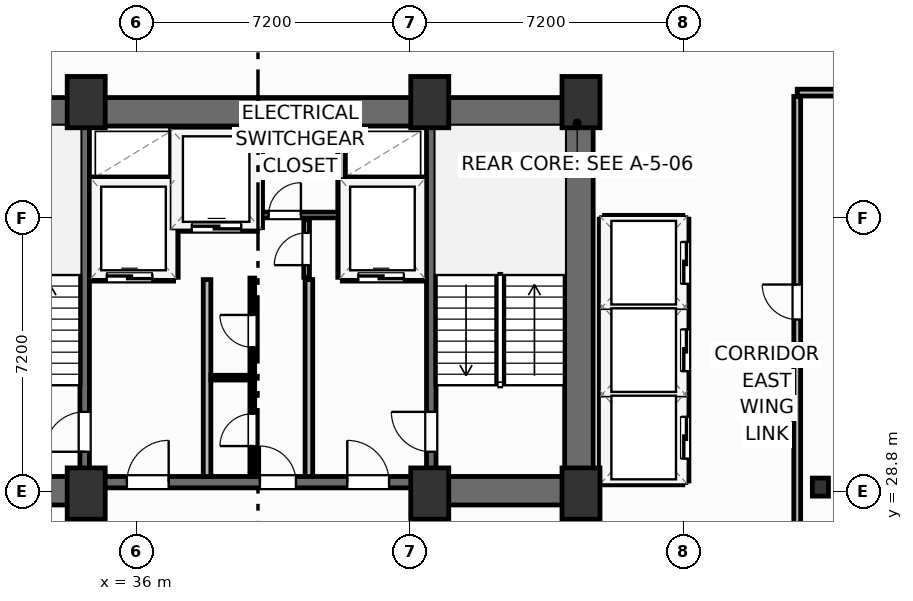
"""IFC4 building model, lengths in metres.
Left out: names, types, materials, properties, quantities, classifications, styles, units other than length and angle.
Written with IfcOpenShell. Run it as: python <this file> out.ifc"""

import sys

from ifc_helpers import new_model, si_unit, direction, frame, frame_2d, origin, origin_2d, place, context, subcontext, project, spatial, rectangle, i_section, extrude, element, fill, save


model = new_model("IFC4")
c1 = context("Model", 3, precision=1e-05, world=origin(), true_north=direction((0.0, 1.0)))
c2 = subcontext(c1, "Body", "Model", "MODEL_VIEW")
j1 = project(units=[si_unit("LENGTHUNIT", "METRE"), si_unit("PLANEANGLEUNIT", "RADIAN")], contexts=[c1])
p1 = place(None, origin())
s1 = spatial("IfcSite", under=j1, at=p1, CompositionType="ELEMENT")
p2 = place(p1, origin())
s2 = spatial("IfcBuilding", under=s1, at=p2, CompositionType="ELEMENT")
p3 = place(p2, frame((0.0, 0.0, 129.1)))
s3 = spatial("IfcBuildingStorey", under=s2, at=p3, CompositionType="ELEMENT", Elevation=129.1)
for number, where, z_axis, x_axis in (
    (1, (34.68, 28.75, 0.0), (0.0, 0.0, 1.0), (1.0, 0.0, 0.0)),
    (2, (43.72, 28.75, 0.0), (0.0, 0.0, 1.0), (1.0, 0.0, 0.0)),
    (3, (47.7, 28.75, 0.0), (0.0, 0.0, 1.0), (1.0, 0.0, 0.0)),
    (4, (34.68, 39.05, 0.0), (0.0, 0.0, 1.0), (1.0, 0.0, 0.0)),
    (5, (43.72, 39.05, 0.0), (0.0, 0.0, 1.0), (1.0, 0.0, 0.0)),
    (6, (47.7, 39.05, 0.0), (0.0, 0.0, 1.0), (1.0, 0.0, 0.0)),
):
    element("IfcColumn", number, at=place(p3, frame(where, z_axis=z_axis, x_axis=x_axis)), inside=s3, PredefinedType="COLUMN", context=c2, shape_type="SweptSolid", body=[
        extrude(rectangle(XDim=1.0, YDim=1.35, at=origin_2d()), origin(), (0.0, 0.0, 1.0), 3.7),
    ])
p4 = place(p3, frame((54.0, 28.92, 0.0), z_axis=(0.0, 0.0, 1.0), x_axis=(1.0, 0.0, 0.0)))
e7 = element("IfcColumn", 7, at=p4, inside=s3, PredefinedType="COLUMN", context=c2, shape_type="SweptSolid", body=[
    extrude(i_section(OverallWidth=0.424, OverallDepth=0.474, WebThickness=0.048, FlangeThickness=0.077, FilletRadius=0.025, at=origin_2d()), origin(), (0.0, 0.0, 1.0), 3.7),
])
p5 = place(p3, frame((30.38, 38.795, 0.0), z_axis=(0.0, 0.0, 1.0), x_axis=(1.0, 0.0, 0.0)))
e8 = element("IfcWall", 8, at=p5, inside=s3, PredefinedType="SHEAR", context=c2, shape_type="SweptSolid", body=[
    extrude(rectangle(XDim=17.64, YDim=0.75, at=frame_2d((8.82, 0.0))), origin(), (0.0, 0.0, 1.0), 3.45),
])
p6 = place(p3, frame((47.645, 29.2, 0.0), z_axis=(0.0, 0.0, 1.0), x_axis=(0.0, 1.0, 0.0)))
e9 = element("IfcWall", 9, at=p6, inside=s3, PredefinedType="SHEAR", context=c2, shape_type="SweptSolid", body=[
    extrude(rectangle(XDim=9.22, YDim=0.75, at=frame_2d((4.61, 0.0))), origin(), (0.0, 0.0, 1.0), 3.45),
])
p7 = place(p3, frame((30.38, 28.825, 0.0), z_axis=(0.0, 0.0, 1.0), x_axis=(1.0, 0.0, 0.0)))
e10 = element("IfcWall", 10, at=p7, inside=s3, PredefinedType="SHEAR", context=c2, shape_type="SweptSolid", body=[
    extrude(rectangle(XDim=4.42, YDim=0.75, at=frame_2d((2.21, 0.0))), origin(), (0.0, 0.0, 1.0), 3.45),
])
p8 = place(p3, frame((43.6, 28.825, 0.0), z_axis=(0.0, 0.0, 1.0), x_axis=(1.0, 0.0, 0.0)))
e11 = element("IfcWall", 11, at=p8, inside=s3, PredefinedType="SHEAR", context=c2, shape_type="SweptSolid", body=[
    extrude(rectangle(XDim=4.42, YDim=0.75, at=frame_2d((2.21, 0.0))), origin(), (0.0, 0.0, 1.0), 3.45),
])
p9 = place(p3, frame((34.8, 29.05, 0.0), z_axis=(0.0, 0.0, 1.0), x_axis=(1.0, 0.0, 0.0)))
e12 = element("IfcWall", 12, at=p9, inside=s3, PredefinedType="SHEAR", context=c2, shape_type="SweptSolid", body=[
    extrude(rectangle(XDim=8.8, YDim=0.3, at=frame_2d((4.4, 0.0))), origin(), (0.0, 0.0, 1.0), 3.45),
])
p10 = place(p9, frame((0.95, 0.0, 0.0)))
e13 = element("IfcOpeningElement", 13, at=p10, cuts=e12, PredefinedType="OPENING", context=c2, shape_type="SweptSolid", body=[
    extrude(rectangle(XDim=1.1, YDim=2.15, at=frame_2d((0.55, 1.075))), frame((0.0, 0.16, 0.0), z_axis=(0.0, -1.0, 0.0), x_axis=(1.0, 0.0, 0.0)), (0.0, 0.0, 1.0), 0.32),
])
p11 = place(p9, frame((6.75, 0.0, 0.0)))
e14 = element("IfcOpeningElement", 14, at=p11, cuts=e12, PredefinedType="OPENING", context=c2, shape_type="SweptSolid", body=[
    extrude(rectangle(XDim=1.1, YDim=2.15, at=frame_2d((0.55, 1.075))), frame((0.0, 0.16, 0.0), z_axis=(0.0, -1.0, 0.0), x_axis=(1.0, 0.0, 0.0)), (0.0, 0.0, 1.0), 0.32),
])
p12 = place(p9, frame((4.45, 0.0, 0.0)))
e15 = element("IfcOpeningElement", 15, at=p12, cuts=e12, PredefinedType="OPENING", context=c2, shape_type="SweptSolid", body=[
    extrude(rectangle(XDim=0.95, YDim=2.15, at=frame_2d((0.475, 1.075))), frame((0.0, 0.16, 0.0), z_axis=(0.0, -1.0, 0.0), x_axis=(1.0, 0.0, 0.0)), (0.0, 0.0, 1.0), 0.32),
])
p13 = place(p3, frame((34.64, 29.2, 0.0), z_axis=(0.0, 0.0, 1.0), x_axis=(0.0, 1.0, 0.0)))
e16 = element("IfcWall", 16, at=p13, inside=s3, PredefinedType="SHEAR", context=c2, shape_type="SweptSolid", body=[
    extrude(rectangle(XDim=9.22, YDim=0.25, at=frame_2d((4.61, 0.0))), origin(), (0.0, 0.0, 1.0), 3.45),
])
p14 = place(p13, frame((0.65, 0.0, 0.0)))
e17 = element("IfcOpeningElement", 17, at=p14, cuts=e16, PredefinedType="OPENING", context=c2, shape_type="SweptSolid", body=[
    extrude(rectangle(XDim=1.05, YDim=2.15, at=frame_2d((0.525, 1.075))), frame((0.0, 0.135, 0.0), z_axis=(0.0, -1.0, 0.0), x_axis=(1.0, 0.0, 0.0)), (0.0, 0.0, 1.0), 0.27),
])
p15 = place(p3, frame((43.76, 29.2, 0.0), z_axis=(0.0, 0.0, 1.0), x_axis=(0.0, 1.0, 0.0)))
e18 = element("IfcWall", 18, at=p15, inside=s3, PredefinedType="SHEAR", context=c2, shape_type="SweptSolid", body=[
    extrude(rectangle(XDim=9.22, YDim=0.25, at=frame_2d((4.61, 0.0))), origin(), (0.0, 0.0, 1.0), 3.45),
])
p16 = place(p15, frame((0.65, 0.0, 0.0)))
e19 = element("IfcOpeningElement", 19, at=p16, cuts=e18, PredefinedType="OPENING", context=c2, shape_type="SweptSolid", body=[
    extrude(rectangle(XDim=1.05, YDim=2.15, at=frame_2d((0.525, 1.075))), frame((0.0, 0.135, 0.0), z_axis=(0.0, -1.0, 0.0), x_axis=(1.0, 0.0, 0.0)), (0.0, 0.0, 1.0), 0.27),
])
p17 = place(p3, frame((53.39, 27.53, 0.0), z_axis=(0.0, 0.0, 1.0), x_axis=(0.0, 1.0, 0.0)))
e20 = element("IfcWall", 20, at=p17, inside=s3, PredefinedType="PARTITIONING", context=c2, shape_type="SweptSolid", body=[
    extrude(rectangle(XDim=11.67, YDim=0.18, at=frame_2d((5.835, 0.0))), origin(), (0.0, 0.0, 1.0), 3.45),
])
p18 = place(p17, frame((5.8, 0.0, 0.0)))
e21 = element("IfcOpeningElement", 21, at=p18, cuts=e20, PredefinedType="OPENING", context=c2, shape_type="SweptSolid", body=[
    extrude(rectangle(XDim=0.92, YDim=2.05, at=frame_2d((0.46, 1.025))), frame((0.0, 0.1, 0.0), z_axis=(0.0, -1.0, 0.0), x_axis=(1.0, 0.0, 0.0)), (0.0, 0.0, 1.0), 0.2),
])
p19 = place(p3, frame((53.39, 39.3, 0.0), z_axis=(0.0, 0.0, 1.0), x_axis=(1.0, 0.0, 0.0)))
e22 = element("IfcWall", 22, at=p19, inside=s3, PredefinedType="PARTITIONING", context=c2, shape_type="SweptSolid", body=[
    extrude(rectangle(XDim=24.74, YDim=0.18, at=frame_2d((12.37, 0.0))), origin(), (0.0, 0.0, 1.0), 3.45),
])
for number, where, z_axis, x_axis in (
    (23, (37.86, 29.2, 0.0), (0.0, 0.0, 1.0), (0.0, 1.0, 0.0)),
    (24, (40.54, 29.2, 0.0), (0.0, 0.0, 1.0), (0.0, 1.0, 0.0)),
):
    element("IfcWall", number, at=place(p3, frame(where, z_axis=z_axis, x_axis=x_axis)), inside=s3, PredefinedType="PARTITIONING", context=c2, shape_type="SweptSolid", body=[
        extrude(rectangle(XDim=5.18, YDim=0.2, at=frame_2d((2.59, 0.0))), origin(), (0.0, 0.0, 1.0), 3.45),
    ])
p20 = place(p3, frame((34.8, 34.44, 0.0), z_axis=(0.0, 0.0, 1.0), x_axis=(1.0, 0.0, 0.0)))
e25 = element("IfcWall", 25, at=p20, inside=s3, PredefinedType="PARTITIONING", context=c2, shape_type="SweptSolid", body=[
    extrude(rectangle(XDim=2.18, YDim=0.2, at=frame_2d((1.09, 0.0))), origin(), (0.0, 0.0, 1.0), 3.45),
])
p21 = place(p20, frame((0.42, 0.0, 0.0)))
e26 = element("IfcOpeningElement", 26, at=p21, cuts=e25, PredefinedType="OPENING", context=c2, shape_type="SweptSolid", body=[
    extrude(rectangle(XDim=1.2, YDim=2.2, at=frame_2d((0.6, 1.1))), frame((0.0, 0.11, 0.0), z_axis=(0.0, -1.0, 0.0), x_axis=(1.0, 0.0, 0.0)), (0.0, 0.0, 1.0), 0.22),
])
p22 = place(p3, frame((34.8, 36.98, 0.0), z_axis=(0.0, 0.0, 1.0), x_axis=(1.0, 0.0, 0.0)))
e27 = element("IfcWall", 27, at=p22, inside=s3, PredefinedType="PARTITIONING", context=c2, shape_type="SweptSolid", body=[
    extrude(rectangle(XDim=2.18, YDim=0.2, at=frame_2d((1.09, 0.0))), origin(), (0.0, 0.0, 1.0), 3.45),
])
p23 = place(p3, frame((37.0, 34.44, 0.0), z_axis=(0.0, 0.0, 1.0), x_axis=(0.0, 1.0, 0.0)))
e28 = element("IfcWall", 28, at=p23, inside=s3, PredefinedType="PARTITIONING", context=c2, shape_type="SweptSolid", body=[
    extrude(rectangle(XDim=3.9, YDim=0.2, at=frame_2d((1.95, 0.0))), origin(), (0.0, 0.0, 1.0), 3.45),
])
p24 = place(p3, frame((41.42, 34.44, 0.0), z_axis=(0.0, 0.0, 1.0), x_axis=(1.0, 0.0, 0.0)))
e29 = element("IfcWall", 29, at=p24, inside=s3, PredefinedType="PARTITIONING", context=c2, shape_type="SweptSolid", body=[
    extrude(rectangle(XDim=2.18, YDim=0.2, at=frame_2d((1.09, 0.0))), origin(), (0.0, 0.0, 1.0), 3.45),
])
p25 = place(p24, frame((0.42, 0.0, 0.0)))
e30 = element("IfcOpeningElement", 30, at=p25, cuts=e29, PredefinedType="OPENING", context=c2, shape_type="SweptSolid", body=[
    extrude(rectangle(XDim=1.2, YDim=2.2, at=frame_2d((0.6, 1.1))), frame((0.0, 0.11, 0.0), z_axis=(0.0, -1.0, 0.0), x_axis=(1.0, 0.0, 0.0)), (0.0, 0.0, 1.0), 0.22),
])
p26 = place(p3, frame((41.42, 36.98, 0.0), z_axis=(0.0, 0.0, 1.0), x_axis=(1.0, 0.0, 0.0)))
e31 = element("IfcWall", 31, at=p26, inside=s3, PredefinedType="PARTITIONING", context=c2, shape_type="SweptSolid", body=[
    extrude(rectangle(XDim=2.18, YDim=0.2, at=frame_2d((1.09, 0.0))), origin(), (0.0, 0.0, 1.0), 3.45),
])
p27 = place(p3, frame((41.4, 34.44, 0.0), z_axis=(0.0, 0.0, 1.0), x_axis=(0.0, 1.0, 0.0)))
e32 = element("IfcWall", 32, at=p27, inside=s3, PredefinedType="PARTITIONING", context=c2, shape_type="SweptSolid", body=[
    extrude(rectangle(XDim=3.9, YDim=0.2, at=frame_2d((1.95, 0.0))), origin(), (0.0, 0.0, 1.0), 3.45),
])
p28 = place(p3, frame((37.06, 35.75, 0.0), z_axis=(0.0, 0.0, 1.0), x_axis=(1.0, 0.0, 0.0)))
e33 = element("IfcWall", 33, at=p28, inside=s3, PredefinedType="PARTITIONING", context=c2, shape_type="SweptSolid", body=[
    extrude(rectangle(XDim=2.12, YDim=0.2, at=frame_2d((1.06, 0.0))), origin(), (0.0, 0.0, 1.0), 3.45),
])
p29 = place(p28, frame((0.4, 0.0, 0.0)))
e34 = element("IfcOpeningElement", 34, at=p29, cuts=e33, PredefinedType="OPENING", context=c2, shape_type="SweptSolid", body=[
    extrude(rectangle(XDim=1.3, YDim=2.2, at=frame_2d((0.65, 1.1))), frame((0.0, 0.11, 0.0), z_axis=(0.0, -1.0, 0.0), x_axis=(1.0, 0.0, 0.0)), (0.0, 0.0, 1.0), 0.22),
])
p30 = place(p3, frame((39.22, 35.75, 0.0), z_axis=(0.0, 0.0, 1.0), x_axis=(0.0, 1.0, 0.0)))
e35 = element("IfcWall", 35, at=p30, inside=s3, PredefinedType="PARTITIONING", context=c2, shape_type="SweptSolid", body=[
    extrude(rectangle(XDim=2.59, YDim=0.2, at=frame_2d((1.295, 0.0))), origin(), (0.0, 0.0, 1.0), 3.45),
])
p31 = place(p3, frame((39.3, 36.08, 0.0), z_axis=(0.0, 0.0, 1.0), x_axis=(1.0, 0.0, 0.0)))
e36 = element("IfcWall", 36, at=p31, inside=s3, PredefinedType="PARTITIONING", context=c2, shape_type="SweptSolid", body=[
    extrude(rectangle(XDim=2.02, YDim=0.15, at=frame_2d((1.01, 0.0))), origin(), (0.0, 0.0, 1.0), 3.45),
])
p32 = place(p31, frame((0.18, 0.0, 0.0)))
e37 = element("IfcOpeningElement", 37, at=p32, cuts=e36, PredefinedType="OPENING", context=c2, shape_type="SweptSolid", body=[
    extrude(rectangle(XDim=0.85, YDim=2.05, at=frame_2d((0.425, 1.025))), frame((0.0, 0.085, 0.0), z_axis=(0.0, -1.0, 0.0), x_axis=(1.0, 0.0, 0.0)), (0.0, 0.0, 1.0), 0.17),
])
p33 = place(p3, frame((40.48, 34.44, 0.0), z_axis=(0.0, 0.0, 1.0), x_axis=(0.0, 1.0, 0.0)))
e38 = element("IfcWall", 38, at=p33, inside=s3, PredefinedType="PARTITIONING", context=c2, shape_type="SweptSolid", body=[
    extrude(rectangle(XDim=1.52, YDim=0.15, at=frame_2d((0.76, 0.0))), origin(), (0.0, 0.0, 1.0), 3.45),
])
p34 = place(p33, frame((0.32, 0.0, 0.0)))
e39 = element("IfcOpeningElement", 39, at=p34, cuts=e38, PredefinedType="OPENING", context=c2, shape_type="SweptSolid", body=[
    extrude(rectangle(XDim=0.85, YDim=2.05, at=frame_2d((0.425, 1.025))), frame((0.0, 0.085, 0.0), z_axis=(0.0, -1.0, 0.0), x_axis=(1.0, 0.0, 0.0)), (0.0, 0.0, 1.0), 0.17),
])
p35 = place(p3, frame((37.96, 31.8, 0.0), z_axis=(0.0, 0.0, 1.0), x_axis=(1.0, 0.0, 0.0)))
e40 = element("IfcWall", 40, at=p35, inside=s3, PredefinedType="PARTITIONING", context=c2, shape_type="SweptSolid", body=[
    extrude(rectangle(XDim=1.09, YDim=0.125, at=frame_2d((0.545, 0.0))), origin(), (0.0, 0.0, 1.0), 3.45),
])
p36 = place(p3, frame((39.05, 29.2, 0.0), z_axis=(0.0, 0.0, 1.0), x_axis=(0.0, 1.0, 0.0)))
e41 = element("IfcWall", 41, at=p36, inside=s3, PredefinedType="PARTITIONING", context=c2, shape_type="SweptSolid", body=[
    extrude(rectangle(XDim=5.22, YDim=0.125, at=frame_2d((2.61, 0.0))), origin(), (0.0, 0.0, 1.0), 3.45),
])
p37 = place(p36, frame((0.8, 0.0, 0.0)))
e42 = element("IfcOpeningElement", 42, at=p37, cuts=e41, PredefinedType="OPENING", context=c2, shape_type="SweptSolid", body=[
    extrude(rectangle(XDim=0.85, YDim=2.05, at=frame_2d((0.425, 1.025))), frame((0.0, 0.073, 0.0), z_axis=(0.0, -1.0, 0.0), x_axis=(1.0, 0.0, 0.0)), (0.0, 0.0, 1.0), 0.145),
])
p38 = place(p36, frame((3.4, 0.0, 0.0)))
e43 = element("IfcOpeningElement", 43, at=p38, cuts=e41, PredefinedType="OPENING", context=c2, shape_type="SweptSolid", body=[
    extrude(rectangle(XDim=0.85, YDim=2.05, at=frame_2d((0.425, 1.025))), frame((0.0, 0.073, 0.0), z_axis=(0.0, -1.0, 0.0), x_axis=(1.0, 0.0, 0.0)), (0.0, 0.0, 1.0), 0.145),
])
for number, where, z_axis, x_axis in (
    (44, (48.32, 31.375, 0.0), (0.0, 0.0, 1.0), (1.0, 0.0, 0.0)),
    (45, (48.32, 33.675, 0.0), (0.0, 0.0, 1.0), (1.0, 0.0, 0.0)),
):
    element("IfcWall", number, at=place(p3, frame(where, z_axis=z_axis, x_axis=x_axis)), inside=s3, PredefinedType="PARTITIONING", context=c2, shape_type="SweptSolid", body=[
        extrude(rectangle(XDim=2.06, YDim=0.2, at=frame_2d((1.03, 0.0))), origin(), (0.0, 0.0, 1.0), 3.45),
    ])
p39 = place(p3, frame((48.32, 29.08, 0.0), z_axis=(0.0, 0.0, 1.0), x_axis=(1.0, 0.0, 0.0)))
e46 = element("IfcWall", 46, at=p39, inside=s3, PredefinedType="PARTITIONING", context=c2, shape_type="SweptSolid", body=[
    extrude(rectangle(XDim=2.06, YDim=0.2, at=frame_2d((1.03, 0.0))), origin(), (0.0, 0.0, 1.0), 2.662),
])
p40 = place(p3, frame((48.32, 35.97, 0.0), z_axis=(0.0, 0.0, 1.0), x_axis=(1.0, 0.0, 0.0)))
e47 = element("IfcWall", 47, at=p40, inside=s3, PredefinedType="PARTITIONING", context=c2, shape_type="SweptSolid", body=[
    extrude(rectangle(XDim=2.06, YDim=0.2, at=frame_2d((1.03, 0.0))), origin(), (0.0, 0.0, 1.0), 3.45),
])
p41 = place(p3, frame((48.28, 29.08, 0.0), z_axis=(0.0, 0.0, 1.0), x_axis=(0.0, 1.0, 0.0)))
e48 = element("IfcWall", 48, at=p41, inside=s3, PredefinedType="PARTITIONING", context=c2, shape_type="SweptSolid", body=[
    extrude(rectangle(XDim=6.89, YDim=0.2, at=frame_2d((3.445, 0.0))), origin(), (0.0, 0.0, 1.0), 3.45),
])
p42 = place(p3, frame((50.44, 29.08, 0.0), z_axis=(0.0, 0.0, 1.0), x_axis=(0.0, 1.0, 0.0)))
e49 = element("IfcWall", 49, at=p42, inside=s3, PredefinedType="PARTITIONING", context=c2, shape_type="SweptSolid", body=[
    extrude(rectangle(XDim=6.89, YDim=0.2, at=frame_2d((3.445, 0.0))), origin(), (0.0, 0.0, 1.0), 3.45),
])
p43 = place(p42, frame((0.59, 0.0, 0.0)))
e50 = element("IfcOpeningElement", 50, at=p43, cuts=e49, PredefinedType="OPENING", context=c2, shape_type="SweptSolid", body=[
    extrude(rectangle(XDim=1.1, YDim=2.15, at=frame_2d((0.55, 1.075))), frame((0.0, 0.11, 0.0), z_axis=(0.0, -1.0, 0.0), x_axis=(1.0, 0.0, 0.0)), (0.0, 0.0, 1.0), 0.22),
])
p44 = place(p42, frame((2.89, 0.0, 0.0)))
e51 = element("IfcOpeningElement", 51, at=p44, cuts=e49, PredefinedType="OPENING", context=c2, shape_type="SweptSolid", body=[
    extrude(rectangle(XDim=1.1, YDim=2.15, at=frame_2d((0.55, 1.075))), frame((0.0, 0.11, 0.0), z_axis=(0.0, -1.0, 0.0), x_axis=(1.0, 0.0, 0.0)), (0.0, 0.0, 1.0), 0.22),
])
p45 = place(p42, frame((5.19, 0.0, 0.0)))
e52 = element("IfcOpeningElement", 52, at=p45, cuts=e49, PredefinedType="OPENING", context=c2, shape_type="SweptSolid", body=[
    extrude(rectangle(XDim=1.1, YDim=2.15, at=frame_2d((0.55, 1.075))), frame((0.0, 0.11, 0.0), z_axis=(0.0, -1.0, 0.0), x_axis=(1.0, 0.0, 0.0)), (0.0, 0.0, 1.0), 0.22),
])
p46 = place(p18, origin())
e53 = element("IfcDoor", 53, at=p46, inside=s3, OperationType="SINGLE_SWING_RIGHT", PredefinedType="DOOR", context=c2, shape_type="SweptSolid", body=[
    extrude(rectangle(XDim=0.92, YDim=2.05, at=frame_2d((0.46, 1.025))), frame((0.0, 0.025, 0.0), z_axis=(0.0, -1.0, 0.0), x_axis=(1.0, 0.0, 0.0)), (0.0, 0.0, 1.0), 0.05),
])
fill(e21, e53)
p47 = place(p14, origin())
e54 = element("IfcDoor", 54, at=p47, inside=s3, OperationType="SINGLE_SWING_LEFT", PredefinedType="DOOR", context=c2, shape_type="SweptSolid", body=[
    extrude(rectangle(XDim=1.05, YDim=2.15, at=frame_2d((0.525, 1.075))), frame((0.0, 0.025, 0.0), z_axis=(0.0, -1.0, 0.0), x_axis=(1.0, 0.0, 0.0)), (0.0, 0.0, 1.0), 0.05),
])
fill(e17, e54)
p48 = place(p16, origin())
e55 = element("IfcDoor", 55, at=p48, inside=s3, OperationType="SINGLE_SWING_RIGHT", PredefinedType="DOOR", context=c2, shape_type="SweptSolid", body=[
    extrude(rectangle(XDim=1.05, YDim=2.15, at=frame_2d((0.525, 1.075))), frame((0.0, 0.025, 0.0), z_axis=(0.0, -1.0, 0.0), x_axis=(1.0, 0.0, 0.0)), (0.0, 0.0, 1.0), 0.05),
])
fill(e19, e55)
p49 = place(p10, origin())
e56 = element("IfcDoor", 56, at=p49, inside=s3, OperationType="SINGLE_SWING_RIGHT", PredefinedType="DOOR", context=c2, shape_type="SweptSolid", body=[
    extrude(rectangle(XDim=1.1, YDim=2.15, at=frame_2d((0.55, 1.075))), frame((0.0, 0.025, 0.0), z_axis=(0.0, -1.0, 0.0), x_axis=(1.0, 0.0, 0.0)), (0.0, 0.0, 1.0), 0.05),
])
fill(e13, e56)
p50 = place(p11, origin())
e57 = element("IfcDoor", 57, at=p50, inside=s3, OperationType="SINGLE_SWING_LEFT", PredefinedType="DOOR", context=c2, shape_type="SweptSolid", body=[
    extrude(rectangle(XDim=1.1, YDim=2.15, at=frame_2d((0.55, 1.075))), frame((0.0, 0.025, 0.0), z_axis=(0.0, -1.0, 0.0), x_axis=(1.0, 0.0, 0.0)), (0.0, 0.0, 1.0), 0.05),
])
fill(e14, e57)
p51 = place(p21, origin())
e58 = element("IfcDoor", 58, at=p51, inside=s3, OperationType="SLIDING_TO_LEFT", PredefinedType="DOOR", context=c2, shape_type="SweptSolid", body=[
    extrude(rectangle(XDim=1.2, YDim=2.2, at=frame_2d((0.6, 1.1))), frame((0.0, 0.025, 0.0), z_axis=(0.0, -1.0, 0.0), x_axis=(1.0, 0.0, 0.0)), (0.0, 0.0, 1.0), 0.05),
])
fill(e26, e58)
p52 = place(p25, origin())
e59 = element("IfcDoor", 59, at=p52, inside=s3, OperationType="SLIDING_TO_LEFT", PredefinedType="DOOR", context=c2, shape_type="SweptSolid", body=[
    extrude(rectangle(XDim=1.2, YDim=2.2, at=frame_2d((0.6, 1.1))), frame((0.0, 0.025, 0.0), z_axis=(0.0, -1.0, 0.0), x_axis=(1.0, 0.0, 0.0)), (0.0, 0.0, 1.0), 0.05),
])
fill(e30, e59)
p53 = place(p29, origin())
e60 = element("IfcDoor", 60, at=p53, inside=s3, OperationType="SLIDING_TO_LEFT", PredefinedType="DOOR", context=c2, shape_type="SweptSolid", body=[
    extrude(rectangle(XDim=1.3, YDim=2.2, at=frame_2d((0.65, 1.1))), frame((0.0, 0.025, 0.0), z_axis=(0.0, -1.0, 0.0), x_axis=(1.0, 0.0, 0.0)), (0.0, 0.0, 1.0), 0.05),
])
fill(e34, e60)
p54 = place(p32, origin())
e61 = element("IfcDoor", 61, at=p54, inside=s3, OperationType="SINGLE_SWING_RIGHT", PredefinedType="DOOR", context=c2, shape_type="SweptSolid", body=[
    extrude(rectangle(XDim=0.85, YDim=2.05, at=frame_2d((0.425, 1.025))), frame((0.0, 0.025, 0.0), z_axis=(0.0, -1.0, 0.0), x_axis=(1.0, 0.0, 0.0)), (0.0, 0.0, 1.0), 0.05),
])
fill(e37, e61)
p55 = place(p34, origin())
e62 = element("IfcDoor", 62, at=p55, inside=s3, OperationType="SINGLE_SWING_LEFT", PredefinedType="DOOR", context=c2, shape_type="SweptSolid", body=[
    extrude(rectangle(XDim=0.85, YDim=2.05, at=frame_2d((0.425, 1.025))), frame((0.0, 0.025, 0.0), z_axis=(0.0, -1.0, 0.0), x_axis=(1.0, 0.0, 0.0)), (0.0, 0.0, 1.0), 0.05),
])
fill(e39, e62)
p56 = place(p37, origin())
e63 = element("IfcDoor", 63, at=p56, inside=s3, OperationType="SINGLE_SWING_LEFT", PredefinedType="DOOR", context=c2, shape_type="SweptSolid", body=[
    extrude(rectangle(XDim=0.85, YDim=2.05, at=frame_2d((0.425, 1.025))), frame((0.0, 0.025, 0.0), z_axis=(0.0, -1.0, 0.0), x_axis=(1.0, 0.0, 0.0)), (0.0, 0.0, 1.0), 0.05),
])
fill(e42, e63)
p57 = place(p38, origin())
e64 = element("IfcDoor", 64, at=p57, inside=s3, OperationType="SINGLE_SWING_RIGHT", PredefinedType="DOOR", context=c2, shape_type="SweptSolid", body=[
    extrude(rectangle(XDim=0.85, YDim=2.05, at=frame_2d((0.425, 1.025))), frame((0.0, 0.025, 0.0), z_axis=(0.0, -1.0, 0.0), x_axis=(1.0, 0.0, 0.0)), (0.0, 0.0, 1.0), 0.05),
])
fill(e43, e64)
p58 = place(p12, origin())
e65 = element("IfcDoor", 65, at=p58, inside=s3, OperationType="SINGLE_SWING_LEFT", PredefinedType="DOOR", context=c2, shape_type="SweptSolid", body=[
    extrude(rectangle(XDim=0.95, YDim=2.15, at=frame_2d((0.475, 1.075))), frame((0.0, 0.025, 0.0), z_axis=(0.0, -1.0, 0.0), x_axis=(1.0, 0.0, 0.0)), (0.0, 0.0, 1.0), 0.05),
])
fill(e15, e65)
p59 = place(p43, origin())
e66 = element("IfcDoor", 66, at=p59, inside=s3, OperationType="SLIDING_TO_LEFT", PredefinedType="DOOR", context=c2, shape_type="SweptSolid", body=[
    extrude(rectangle(XDim=1.1, YDim=2.15, at=frame_2d((0.55, 1.075))), frame((0.0, 0.025, 0.0), z_axis=(0.0, -1.0, 0.0), x_axis=(1.0, 0.0, 0.0)), (0.0, 0.0, 1.0), 0.05),
])
fill(e50, e66)
p60 = place(p44, origin())
e67 = element("IfcDoor", 67, at=p60, inside=s3, OperationType="SLIDING_TO_LEFT", PredefinedType="DOOR", context=c2, shape_type="SweptSolid", body=[
    extrude(rectangle(XDim=1.1, YDim=2.15, at=frame_2d((0.55, 1.075))), frame((0.0, 0.025, 0.0), z_axis=(0.0, -1.0, 0.0), x_axis=(1.0, 0.0, 0.0)), (0.0, 0.0, 1.0), 0.05),
])
fill(e51, e67)
p61 = place(p45, origin())
e68 = element("IfcDoor", 68, at=p61, inside=s3, OperationType="SLIDING_TO_LEFT", PredefinedType="DOOR", context=c2, shape_type="SweptSolid", body=[
    extrude(rectangle(XDim=1.1, YDim=2.15, at=frame_2d((0.55, 1.075))), frame((0.0, 0.025, 0.0), z_axis=(0.0, -1.0, 0.0), x_axis=(1.0, 0.0, 0.0)), (0.0, 0.0, 1.0), 0.05),
])
fill(e52, e68)
save(model, sys.argv[1])
